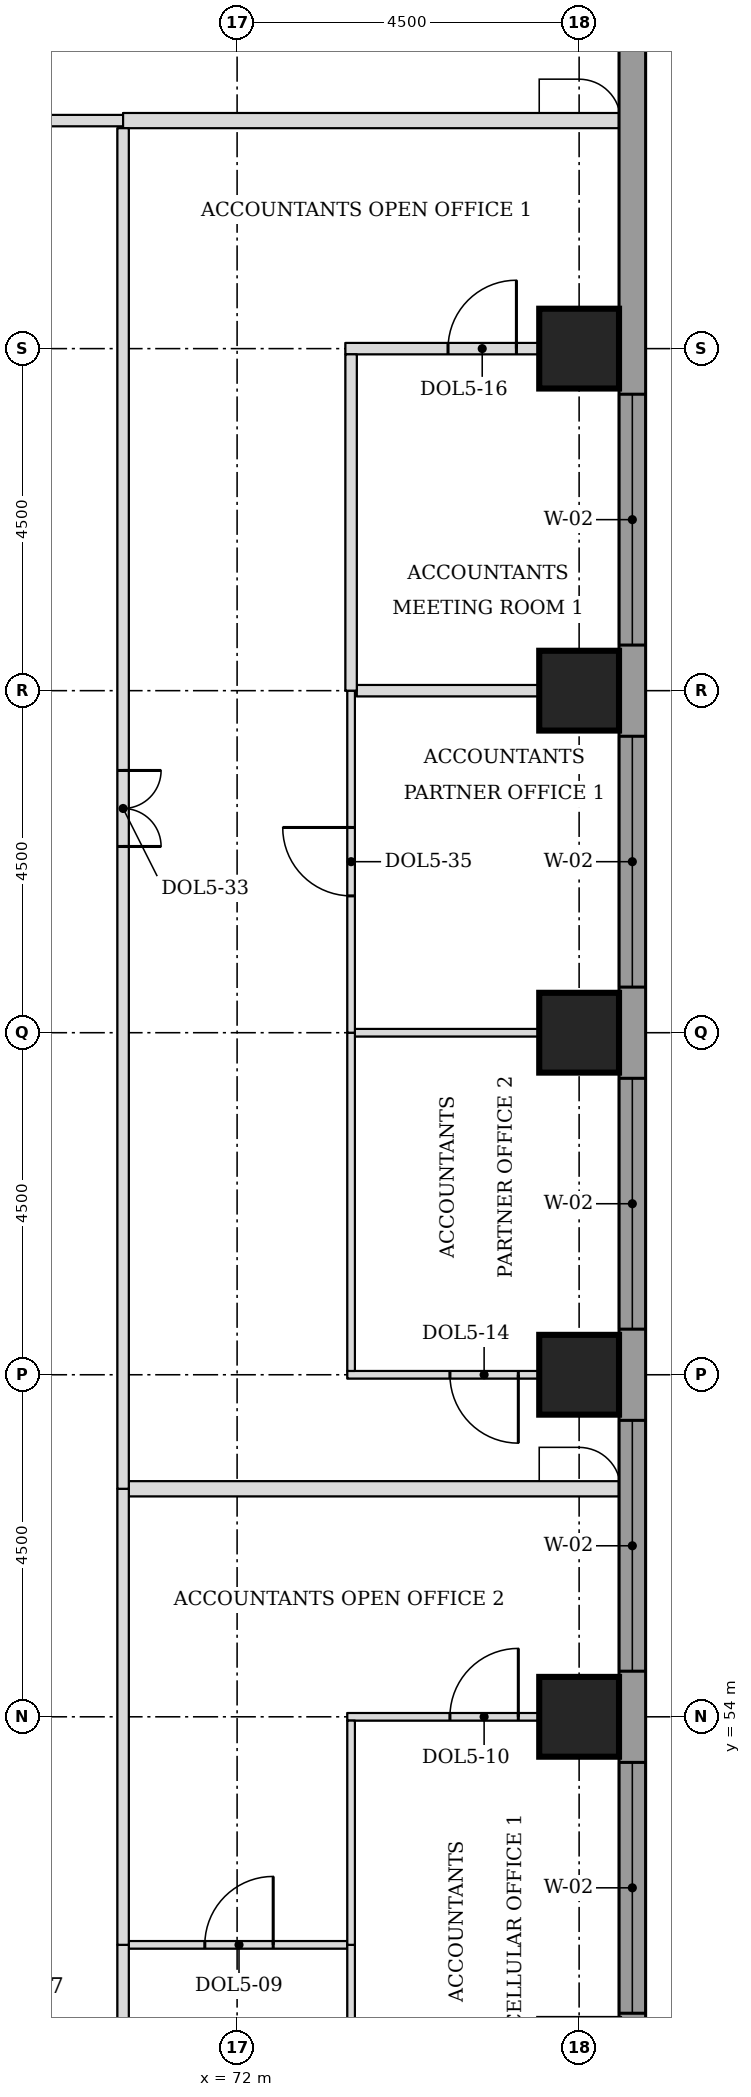
"""IFC4 building model, lengths in metres.
Left out: names, types, materials, properties, quantities, classifications, styles, units other than length and angle.
Written with IfcOpenShell. Run it as: python <this file> out.ifc"""

import sys

from ifc_helpers import new_model, si_unit, direction, frame, frame_2d, origin, origin_2d, place, context, subcontext, project, spatial, rectangle, extrude, element, fill, save


model = new_model("IFC4")
c1 = context("Model", 3, precision=1e-05, world=origin(), true_north=direction((0.0, 1.0)))
c2 = subcontext(c1, "Body", "Model", "MODEL_VIEW")
j1 = project(units=[si_unit("LENGTHUNIT", "METRE"), si_unit("PLANEANGLEUNIT", "RADIAN")], contexts=[c1])
p1 = place(None, origin())
s1 = spatial("IfcSite", under=j1, at=p1, CompositionType="ELEMENT")
p2 = place(p1, origin())
s2 = spatial("IfcBuilding", under=s1, at=p2, CompositionType="ELEMENT")
p3 = place(p2, frame((0.0, 0.0, 108.5)))
s3 = spatial("IfcBuildingStorey", under=s2, at=p3, CompositionType="ELEMENT", Elevation=108.5)
for number, where, z_axis, x_axis in (
    (1, (76.5, 54.0, 0.0), (0.0, 0.0, 1.0), (1.0, 0.0, 0.0)),
    (2, (76.5, 58.5, 0.0), (0.0, 0.0, 1.0), (1.0, 0.0, 0.0)),
    (3, (76.5, 63.0, 0.0), (0.0, 0.0, 1.0), (1.0, 0.0, 0.0)),
    (4, (76.5, 67.5, 0.0), (0.0, 0.0, 1.0), (1.0, 0.0, 0.0)),
    (5, (76.5, 72.0, 0.0), (0.0, 0.0, 1.0), (1.0, 0.0, 0.0)),
):
    element("IfcColumn", number, at=place(p3, frame(where, z_axis=z_axis, x_axis=x_axis)), inside=s3, PredefinedType="COLUMN", context=c2, shape_type="SweptSolid", body=[
        extrude(rectangle(XDim=1.05, YDim=1.05, at=origin_2d()), origin(), (0.0, 0.0, 1.0), 3.7),
    ])
p4 = place(p3, frame((77.2, 44.638, 0.0), z_axis=(0.0, 0.0, 1.0), x_axis=(0.0, 1.0, 0.0)))
e6 = element("IfcWall", 6, at=p4, inside=s3, PredefinedType="STANDARD", context=c2, shape_type="SweptSolid", body=[
    extrude(rectangle(XDim=32.225, YDim=0.35, at=frame_2d((16.112, 0.0))), origin(), (0.0, 0.0, 1.0), 3.525),
])
p5 = place(p4, frame((5.462, 0.0, 0.9)))
e7 = element("IfcOpeningElement", 7, at=p5, cuts=e6, PredefinedType="OPENING", context=c2, shape_type="SweptSolid", body=[
    extrude(rectangle(XDim=3.3, YDim=1.9, at=frame_2d((1.65, 0.95))), frame((0.0, 0.185, 0.0), z_axis=(0.0, -1.0, 0.0), x_axis=(1.0, 0.0, 0.0)), (0.0, 0.0, 1.0), 0.37),
])
p6 = place(p4, frame((9.962, 0.0, 0.9)))
e8 = element("IfcOpeningElement", 8, at=p6, cuts=e6, PredefinedType="OPENING", context=c2, shape_type="SweptSolid", body=[
    extrude(rectangle(XDim=3.3, YDim=1.9, at=frame_2d((1.65, 0.95))), frame((0.0, 0.185, 0.0), z_axis=(0.0, -1.0, 0.0), x_axis=(1.0, 0.0, 0.0)), (0.0, 0.0, 1.0), 0.37),
])
p7 = place(p4, frame((14.462, 0.0, 0.9)))
e9 = element("IfcOpeningElement", 9, at=p7, cuts=e6, PredefinedType="OPENING", context=c2, shape_type="SweptSolid", body=[
    extrude(rectangle(XDim=3.3, YDim=1.9, at=frame_2d((1.65, 0.95))), frame((0.0, 0.185, 0.0), z_axis=(0.0, -1.0, 0.0), x_axis=(1.0, 0.0, 0.0)), (0.0, 0.0, 1.0), 0.37),
])
p8 = place(p4, frame((18.962, 0.0, 0.9)))
e10 = element("IfcOpeningElement", 10, at=p8, cuts=e6, PredefinedType="OPENING", context=c2, shape_type="SweptSolid", body=[
    extrude(rectangle(XDim=3.3, YDim=1.9, at=frame_2d((1.65, 0.95))), frame((0.0, 0.185, 0.0), z_axis=(0.0, -1.0, 0.0), x_axis=(1.0, 0.0, 0.0)), (0.0, 0.0, 1.0), 0.37),
])
p9 = place(p4, frame((23.462, 0.0, 0.9)))
e11 = element("IfcOpeningElement", 11, at=p9, cuts=e6, PredefinedType="OPENING", context=c2, shape_type="SweptSolid", body=[
    extrude(rectangle(XDim=3.3, YDim=1.9, at=frame_2d((1.65, 0.95))), frame((0.0, 0.185, 0.0), z_axis=(0.0, -1.0, 0.0), x_axis=(1.0, 0.0, 0.0)), (0.0, 0.0, 1.0), 0.37),
])
p10 = place(p3, frame((70.575, 51.0, 0.0), z_axis=(0.0, 0.0, 1.0), x_axis=(1.0, 0.0, 0.0)))
e12 = element("IfcWall", 12, at=p10, inside=s3, PredefinedType="PARTITIONING", context=c2, shape_type="SweptSolid", body=[
    extrude(rectangle(XDim=2.875, YDim=0.1, at=frame_2d((1.438, 0.0))), origin(), (0.0, 0.0, 1.0), 3.022),
])
p11 = place(p10, frame((1.0, 0.0, 0.0)))
e13 = element("IfcOpeningElement", 13, at=p11, cuts=e12, PredefinedType="OPENING", context=c2, shape_type="SweptSolid", body=[
    extrude(rectangle(XDim=0.9, YDim=2.1, at=frame_2d((0.45, 1.05))), frame((0.0, 0.06, 0.0), z_axis=(0.0, -1.0, 0.0), x_axis=(1.0, 0.0, 0.0)), (0.0, 0.0, 1.0), 0.12),
])
p12 = place(p3, frame((73.45, 54.0, 0.0), z_axis=(0.0, 0.0, 1.0), x_axis=(1.0, 0.0, 0.0)))
e14 = element("IfcWall", 14, at=p12, inside=s3, PredefinedType="PARTITIONING", context=c2, shape_type="SweptSolid", body=[
    extrude(rectangle(XDim=3.575, YDim=0.1, at=frame_2d((1.788, 0.0))), origin(), (0.0, 0.0, 1.0), 3.55),
])
p13 = place(p12, frame((1.35, 0.0, 0.0)))
e15 = element("IfcOpeningElement", 15, at=p13, cuts=e14, PredefinedType="OPENING", context=c2, shape_type="SweptSolid", body=[
    extrude(rectangle(XDim=0.9, YDim=2.1, at=frame_2d((0.45, 1.05))), frame((0.0, 0.06, 0.0), z_axis=(0.0, -1.0, 0.0), x_axis=(1.0, 0.0, 0.0)), (0.0, 0.0, 1.0), 0.12),
])
p14 = place(p3, frame((70.575, 57.0, 0.0), z_axis=(0.0, 0.0, 1.0), x_axis=(1.0, 0.0, 0.0)))
e16 = element("IfcWall", 16, at=p14, inside=s3, PredefinedType="PARTITIONING", context=c2, shape_type="SweptSolid", body=[
    extrude(rectangle(XDim=6.45, YDim=0.2, at=frame_2d((3.225, 0.0))), origin(), (0.0, 0.0, 1.0), 3.55),
])
p15 = place(p3, frame((73.45, 58.5, 0.0), z_axis=(0.0, 0.0, 1.0), x_axis=(1.0, 0.0, 0.0)))
e17 = element("IfcWall", 17, at=p15, inside=s3, PredefinedType="PARTITIONING", context=c2, shape_type="SweptSolid", body=[
    extrude(rectangle(XDim=3.575, YDim=0.1, at=frame_2d((1.788, 0.0))), origin(), (0.0, 0.0, 1.0), 3.55),
])
p16 = place(p15, frame((1.35, 0.0, 0.0)))
e18 = element("IfcOpeningElement", 18, at=p16, cuts=e17, PredefinedType="OPENING", context=c2, shape_type="SweptSolid", body=[
    extrude(rectangle(XDim=0.9, YDim=2.1, at=frame_2d((0.45, 1.05))), frame((0.0, 0.06, 0.0), z_axis=(0.0, -1.0, 0.0), x_axis=(1.0, 0.0, 0.0)), (0.0, 0.0, 1.0), 0.12),
])
p17 = place(p3, frame((73.55, 63.0, 0.0), z_axis=(0.0, 0.0, 1.0), x_axis=(1.0, 0.0, 0.0)))
e19 = element("IfcWall", 19, at=p17, inside=s3, PredefinedType="PARTITIONING", context=c2, shape_type="SweptSolid", body=[
    extrude(rectangle(XDim=3.475, YDim=0.1, at=frame_2d((1.737, 0.0))), origin(), (0.0, 0.0, 1.0), 3.55),
])
p18 = place(p3, frame((73.575, 67.5, 0.0), z_axis=(0.0, 0.0, 1.0), x_axis=(1.0, 0.0, 0.0)))
e20 = element("IfcWall", 20, at=p18, inside=s3, PredefinedType="PARTITIONING", context=c2, shape_type="SweptSolid", body=[
    extrude(rectangle(XDim=3.45, YDim=0.15, at=frame_2d((1.725, 0.0))), origin(), (0.0, 0.0, 1.0), 3.55),
])
p19 = place(p3, frame((73.425, 72.0, 0.0), z_axis=(0.0, 0.0, 1.0), x_axis=(1.0, 0.0, 0.0)))
e21 = element("IfcWall", 21, at=p19, inside=s3, PredefinedType="PARTITIONING", context=c2, shape_type="SweptSolid", body=[
    extrude(rectangle(XDim=3.6, YDim=0.15, at=frame_2d((1.8, 0.0))), origin(), (0.0, 0.0, 1.0), 3.55),
])
p20 = place(p19, frame((1.35, 0.0, 0.0)))
e22 = element("IfcOpeningElement", 22, at=p20, cuts=e21, PredefinedType="OPENING", context=c2, shape_type="SweptSolid", body=[
    extrude(rectangle(XDim=0.9, YDim=2.1, at=frame_2d((0.45, 1.05))), frame((0.0, 0.085, 0.0), z_axis=(0.0, -1.0, 0.0), x_axis=(1.0, 0.0, 0.0)), (0.0, 0.0, 1.0), 0.17),
])
p21 = place(p3, frame((63.0, 75.0, 0.0), z_axis=(0.0, 0.0, 1.0), x_axis=(1.0, 0.0, 0.0)))
e23 = element("IfcWall", 23, at=p21, inside=s3, PredefinedType="PARTITIONING", context=c2, shape_type="SweptSolid", body=[
    extrude(rectangle(XDim=7.5, YDim=0.15, at=frame_2d((3.75, 0.0))), origin(), (0.0, 0.0, 1.0), 3.55),
])
p22 = place(p21, frame((3.25, 0.0, 0.0)))
e24 = element("IfcOpeningElement", 24, at=p22, cuts=e23, PredefinedType="OPENING", context=c2, shape_type="SweptSolid", body=[
    extrude(rectangle(XDim=1.0, YDim=2.1, at=frame_2d((0.5, 1.05))), frame((0.0, 0.085, 0.0), z_axis=(0.0, -1.0, 0.0), x_axis=(1.0, 0.0, 0.0)), (0.0, 0.0, 1.0), 0.17),
])
p23 = place(p3, frame((70.5, 75.0, 0.0), z_axis=(0.0, 0.0, 1.0), x_axis=(1.0, 0.0, 0.0)))
e25 = element("IfcWall", 25, at=p23, inside=s3, PredefinedType="PARTITIONING", context=c2, shape_type="SweptSolid", body=[
    extrude(rectangle(XDim=6.525, YDim=0.2, at=frame_2d((3.262, 0.0))), origin(), (0.0, 0.0, 1.0), 3.55),
])
p24 = place(p3, frame((70.5, 46.6, 0.0), z_axis=(0.0, 0.0, 1.0), x_axis=(0.0, 1.0, 0.0)))
e26 = element("IfcWall", 26, at=p24, inside=s3, PredefinedType="PARTITIONING", context=c2, shape_type="SweptSolid", body=[
    extrude(rectangle(XDim=4.4, YDim=0.15, at=frame_2d((2.2, 0.0))), origin(), (0.0, 0.0, 1.0), 3.55),
])
p25 = place(p24, frame((1.7, 0.0, 0.0)))
e27 = element("IfcOpeningElement", 27, at=p25, cuts=e26, PredefinedType="OPENING", context=c2, shape_type="SweptSolid", body=[
    extrude(rectangle(XDim=1.0, YDim=2.1, at=frame_2d((0.5, 1.05))), frame((0.0, 0.085, 0.0), z_axis=(0.0, -1.0, 0.0), x_axis=(1.0, 0.0, 0.0)), (0.0, 0.0, 1.0), 0.17),
])
p26 = place(p3, frame((73.5, 49.55, 0.0), z_axis=(0.0, 0.0, 1.0), x_axis=(0.0, 1.0, 0.0)))
e28 = element("IfcWall", 28, at=p26, inside=s3, PredefinedType="PARTITIONING", context=c2, shape_type="SweptSolid", body=[
    extrude(rectangle(XDim=1.45, YDim=0.1, at=frame_2d((0.725, 0.0))), origin(), (0.0, 0.0, 1.0), 3.55),
])
p27 = place(p3, frame((70.5, 51.0, 0.0), z_axis=(0.0, 0.0, 1.0), x_axis=(0.0, 1.0, 0.0)))
e29 = element("IfcWall", 29, at=p27, inside=s3, PredefinedType="PARTITIONING", context=c2, shape_type="SweptSolid", body=[
    extrude(rectangle(XDim=6.0, YDim=0.15, at=frame_2d((3.0, 0.0))), origin(), (0.0, 0.0, 1.0), 3.55),
])
p28 = place(p3, frame((73.5, 51.0, 0.0), z_axis=(0.0, 0.0, 1.0), x_axis=(0.0, 1.0, 0.0)))
e30 = element("IfcWall", 30, at=p28, inside=s3, PredefinedType="PARTITIONING", context=c2, shape_type="SweptSolid", body=[
    extrude(rectangle(XDim=2.95, YDim=0.1, at=frame_2d((1.475, 0.0))), origin(), (0.0, 0.0, 1.0), 3.55),
])
p29 = place(p3, frame((70.5, 57.0, 0.0), z_axis=(0.0, 0.0, 1.0), x_axis=(0.0, 1.0, 0.0)))
e31 = element("IfcWall", 31, at=p29, inside=s3, PredefinedType="PARTITIONING", context=c2, shape_type="SweptSolid", body=[
    extrude(rectangle(XDim=17.9, YDim=0.15, at=frame_2d((8.95, 0.0))), origin(), (0.0, 0.0, 1.0), 3.55),
])
p30 = place(p29, frame((8.45, 0.0, 0.0)))
e32 = element("IfcOpeningElement", 32, at=p30, cuts=e31, PredefinedType="OPENING", context=c2, shape_type="SweptSolid", body=[
    extrude(rectangle(XDim=1.0, YDim=2.1, at=frame_2d((0.5, 1.05))), frame((0.0, 0.085, 0.0), z_axis=(0.0, -1.0, 0.0), x_axis=(1.0, 0.0, 0.0)), (0.0, 0.0, 1.0), 0.17),
])
p31 = place(p3, frame((73.5, 58.55, 0.0), z_axis=(0.0, 0.0, 1.0), x_axis=(0.0, 1.0, 0.0)))
e33 = element("IfcWall", 33, at=p31, inside=s3, PredefinedType="PARTITIONING", context=c2, shape_type="SweptSolid", body=[
    extrude(rectangle(XDim=4.45, YDim=0.1, at=frame_2d((2.225, 0.0))), origin(), (0.0, 0.0, 1.0), 3.55),
])
p32 = place(p3, frame((73.5, 63.0, 0.0), z_axis=(0.0, 0.0, 1.0), x_axis=(0.0, 1.0, 0.0)))
e34 = element("IfcWall", 34, at=p32, inside=s3, PredefinedType="PARTITIONING", context=c2, shape_type="SweptSolid", body=[
    extrude(rectangle(XDim=4.5, YDim=0.1, at=frame_2d((2.25, 0.0))), origin(), (0.0, 0.0, 1.0), 3.55),
])
p33 = place(p32, frame((1.8, 0.0, 0.0)))
e35 = element("IfcOpeningElement", 35, at=p33, cuts=e34, PredefinedType="OPENING", context=c2, shape_type="SweptSolid", body=[
    extrude(rectangle(XDim=0.9, YDim=2.1, at=frame_2d((0.45, 1.05))), frame((0.0, 0.06, 0.0), z_axis=(0.0, -1.0, 0.0), x_axis=(1.0, 0.0, 0.0)), (0.0, 0.0, 1.0), 0.12),
])
p34 = place(p3, frame((73.5, 67.5, 0.0), z_axis=(0.0, 0.0, 1.0), x_axis=(0.0, 1.0, 0.0)))
e36 = element("IfcWall", 36, at=p34, inside=s3, PredefinedType="PARTITIONING", context=c2, shape_type="SweptSolid", body=[
    extrude(rectangle(XDim=4.425, YDim=0.15, at=frame_2d((2.212, 0.0))), origin(), (0.0, 0.0, 1.0), 3.55),
])
p35 = place(p5, origin())
e37 = element("IfcWindow", 37, at=p35, inside=s3, PartitioningType="SINGLE_PANEL", PredefinedType="WINDOW", context=c2, shape_type="SweptSolid", body=[
    extrude(rectangle(XDim=3.3, YDim=1.9, at=frame_2d((1.65, 0.95))), frame((0.0, 0.085, 0.0), z_axis=(0.0, -1.0, 0.0), x_axis=(1.0, 0.0, 0.0)), (0.0, 0.0, 1.0), 0.06),
])
fill(e7, e37)
p36 = place(p6, origin())
e38 = element("IfcWindow", 38, at=p36, inside=s3, PartitioningType="SINGLE_PANEL", PredefinedType="WINDOW", context=c2, shape_type="SweptSolid", body=[
    extrude(rectangle(XDim=3.3, YDim=1.9, at=frame_2d((1.65, 0.95))), frame((0.0, 0.085, 0.0), z_axis=(0.0, -1.0, 0.0), x_axis=(1.0, 0.0, 0.0)), (0.0, 0.0, 1.0), 0.06),
])
fill(e8, e38)
p37 = place(p7, origin())
e39 = element("IfcWindow", 39, at=p37, inside=s3, PartitioningType="SINGLE_PANEL", PredefinedType="WINDOW", context=c2, shape_type="SweptSolid", body=[
    extrude(rectangle(XDim=3.3, YDim=1.9, at=frame_2d((1.65, 0.95))), frame((0.0, 0.085, 0.0), z_axis=(0.0, -1.0, 0.0), x_axis=(1.0, 0.0, 0.0)), (0.0, 0.0, 1.0), 0.06),
])
fill(e9, e39)
p38 = place(p8, origin())
e40 = element("IfcWindow", 40, at=p38, inside=s3, PartitioningType="SINGLE_PANEL", PredefinedType="WINDOW", context=c2, shape_type="SweptSolid", body=[
    extrude(rectangle(XDim=3.3, YDim=1.9, at=frame_2d((1.65, 0.95))), frame((0.0, 0.085, 0.0), z_axis=(0.0, -1.0, 0.0), x_axis=(1.0, 0.0, 0.0)), (0.0, 0.0, 1.0), 0.06),
])
fill(e10, e40)
p39 = place(p9, origin())
e41 = element("IfcWindow", 41, at=p39, inside=s3, PartitioningType="SINGLE_PANEL", PredefinedType="WINDOW", context=c2, shape_type="SweptSolid", body=[
    extrude(rectangle(XDim=3.3, YDim=1.9, at=frame_2d((1.65, 0.95))), frame((0.0, 0.085, 0.0), z_axis=(0.0, -1.0, 0.0), x_axis=(1.0, 0.0, 0.0)), (0.0, 0.0, 1.0), 0.06),
])
fill(e11, e41)
p40 = place(p11, origin())
e42 = element("IfcDoor", 42, at=p40, inside=s3, OperationType="SINGLE_SWING_RIGHT", PredefinedType="DOOR", context=c2, shape_type="SweptSolid", body=[
    extrude(rectangle(XDim=0.9, YDim=2.1, at=frame_2d((0.45, 1.05))), frame((0.0, 0.025, 0.0), z_axis=(0.0, -1.0, 0.0), x_axis=(1.0, 0.0, 0.0)), (0.0, 0.0, 1.0), 0.05),
])
fill(e13, e42)
p41 = place(p13, origin())
e43 = element("IfcDoor", 43, at=p41, inside=s3, OperationType="SINGLE_SWING_RIGHT", PredefinedType="DOOR", context=c2, shape_type="SweptSolid", body=[
    extrude(rectangle(XDim=0.9, YDim=2.1, at=frame_2d((0.45, 1.05))), frame((0.0, 0.025, 0.0), z_axis=(0.0, -1.0, 0.0), x_axis=(1.0, 0.0, 0.0)), (0.0, 0.0, 1.0), 0.05),
])
fill(e15, e43)
p42 = place(p30, frame((1.0, 0.0, 0.0), z_axis=(0.0, 0.0, 1.0), x_axis=(-1.0, 0.0, 0.0)))
e44 = element("IfcDoor", 44, at=p42, inside=s3, OperationType="DOUBLE_DOOR_SINGLE_SWING", PredefinedType="DOOR", context=c2, shape_type="SweptSolid", body=[
    extrude(rectangle(XDim=1.0, YDim=2.1, at=frame_2d((0.5, 1.05))), frame((0.0, 0.025, 0.0), z_axis=(0.0, -1.0, 0.0), x_axis=(1.0, 0.0, 0.0)), (0.0, 0.0, 1.0), 0.05),
])
fill(e32, e44)
p43 = place(p16, frame((0.9, 0.0, 0.0), z_axis=(0.0, 0.0, 1.0), x_axis=(-1.0, 0.0, 0.0)))
e45 = element("IfcDoor", 45, at=p43, inside=s3, OperationType="SINGLE_SWING_LEFT", PredefinedType="DOOR", context=c2, shape_type="SweptSolid", body=[
    extrude(rectangle(XDim=0.9, YDim=2.1, at=frame_2d((0.45, 1.05))), frame((0.0, 0.025, 0.0), z_axis=(0.0, -1.0, 0.0), x_axis=(1.0, 0.0, 0.0)), (0.0, 0.0, 1.0), 0.05),
])
fill(e18, e45)
p44 = place(p33, origin())
e46 = element("IfcDoor", 46, at=p44, inside=s3, OperationType="SINGLE_SWING_RIGHT", PredefinedType="DOOR", context=c2, shape_type="SweptSolid", body=[
    extrude(rectangle(XDim=0.9, YDim=2.1, at=frame_2d((0.45, 1.05))), frame((0.0, 0.025, 0.0), z_axis=(0.0, -1.0, 0.0), x_axis=(1.0, 0.0, 0.0)), (0.0, 0.0, 1.0), 0.05),
])
fill(e35, e46)
p45 = place(p20, origin())
e47 = element("IfcDoor", 47, at=p45, inside=s3, OperationType="SINGLE_SWING_RIGHT", PredefinedType="DOOR", context=c2, shape_type="SweptSolid", body=[
    extrude(rectangle(XDim=0.9, YDim=2.1, at=frame_2d((0.45, 1.05))), frame((0.0, 0.025, 0.0), z_axis=(0.0, -1.0, 0.0), x_axis=(1.0, 0.0, 0.0)), (0.0, 0.0, 1.0), 0.05),
])
fill(e22, e47)
save(model, sys.argv[1])
